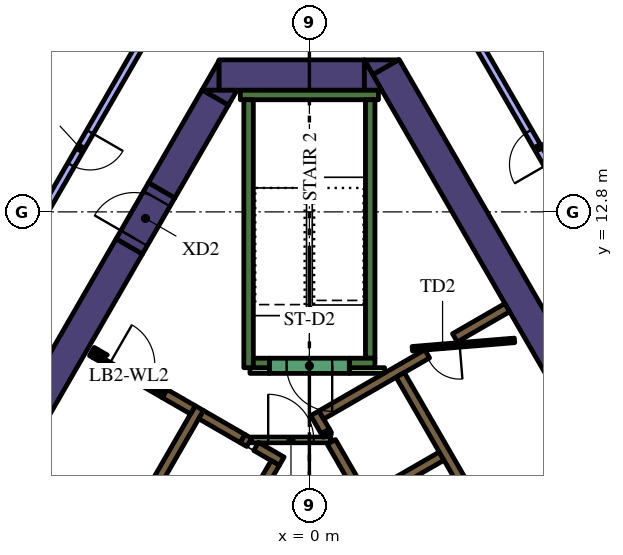
"""IFC4 building model, lengths in metres.
Left out: names, types, materials, properties, quantities, classifications, styles, units other than length and angle.
Written with IfcOpenShell. Run it as: python <this file> out.ifc"""

import sys

from ifc_helpers import new_model, si_unit, direction, frame, frame_2d, origin, place, context, subcontext, project, spatial, polyline, rectangle, outline, extrude, element, fill, save


model = new_model("IFC4")
c1 = context("Model", 3, precision=1e-05, world=origin(), true_north=direction((0.0, 1.0)))
c2 = subcontext(c1, "Body", "Model", "MODEL_VIEW")
j1 = project(units=[si_unit("LENGTHUNIT", "METRE"), si_unit("PLANEANGLEUNIT", "RADIAN")], contexts=[c1])
p1 = place(None, origin())
s1 = spatial("IfcSite", under=j1, at=p1, CompositionType="ELEMENT")
p2 = place(p1, origin())
s2 = spatial("IfcBuilding", under=s1, at=p2, CompositionType="ELEMENT")
p3 = place(p2, frame((0.0, 0.0, 154.2)))
s3 = spatial("IfcBuildingStorey", under=s2, at=p3, CompositionType="ELEMENT", Elevation=154.2)
p4 = place(p3, frame((8.279, 5.761, 0.0), z_axis=(0.0, 0.0, 1.0), x_axis=(-0.500010359015, 0.866019422922, 0.0)))
e1 = element("IfcWall", 1, at=p4, inside=s3, PredefinedType="SOLIDWALL", context=c2, shape_type="SweptSolid", body=[
    extrude(rectangle(XDim=12.528, YDim=0.8, at=frame_2d((6.264, 0.0))), origin(), (0.0, 0.0, 1.0), 4.2),
])
p5 = place(p3, origin())
e2 = element("IfcWall", 2, at=p5, inside=s3, PredefinedType="SOLIDWALL", context=c2, shape_type="SweptSolid", body=[
    extrude(outline(polyline([(1.443, 16.8), (2.339, 16.8), (1.667, 16.412), (1.443, 16.8)])), origin(), (0.0, 0.0, 1.0), 4.2),
])
p6 = place(p3, frame((-2.379, 16.4, 0.0), z_axis=(0.0, 0.0, 1.0), x_axis=(1.0, 0.0, 0.0)))
e3 = element("IfcWall", 3, at=p6, inside=s3, PredefinedType="SOLIDWALL", context=c2, shape_type="SweptSolid", body=[
    extrude(rectangle(XDim=3.824, YDim=0.8, at=frame_2d((1.912, 0.0))), origin(), (0.0, 0.0, 1.0), 4.2),
])
e4 = element("IfcWall", 4, at=p5, inside=s3, PredefinedType="SOLIDWALL", context=c2, shape_type="SweptSolid", body=[
    extrude(outline(polyline([(1.905, 16.0), (1.447, 16.0), (1.447, 16.793), (1.905, 16.0)])), origin(), (0.0, 0.0, 1.0), 4.2),
])
e5 = element("IfcWall", 5, at=p5, inside=s3, PredefinedType="SOLIDWALL", context=c2, shape_type="SweptSolid", body=[
    extrude(outline(polyline([(-2.829, 16.0), (-2.381, 16.776), (-2.381, 16.0), (-2.829, 16.0)])), origin(), (0.0, 0.0, 1.0), 4.2),
])
p7 = place(p3, frame((-2.477, 15.81, 0.0), z_axis=(0.0, 0.0, 1.0), x_axis=(-0.499969377405, -0.866043083026, 0.0)))
e6 = element("IfcWall", 6, at=p7, inside=s3, PredefinedType="SOLIDWALL", context=c2, shape_type="SweptSolid", body=[
    extrude(rectangle(XDim=2.824, YDim=0.8, at=frame_2d((1.412, 0.0))), origin(), (0.0, 0.0, 1.0), 4.2),
])
e7 = element("IfcWall", 7, at=p5, inside=s3, PredefinedType="SOLIDWALL", context=c2, shape_type="SweptSolid", body=[
    extrude(outline(polyline([(-1.905, 16.0), (-2.129, 15.612), (-2.801, 16.0), (-1.905, 16.0)])), origin(), (0.0, 0.0, 1.0), 4.2),
])
p8 = place(p3, frame((-12.668, -1.842, 0.0), z_axis=(0.0, 0.0, 1.0), x_axis=(0.500003640647, 0.866023301845, 0.0)))
e8 = element("IfcWall", 8, at=p8, inside=s3, PredefinedType="SOLIDWALL", context=c2, shape_type="SweptSolid", body=[
    extrude(rectangle(XDim=15.858, YDim=0.8, at=frame_2d((7.929, 0.0))), origin(), (0.0, 0.0, 1.0), 4.2),
])
p9 = place(p3, frame((-1.817, 15.875, 0.0), z_axis=(0.0, 0.0, 1.0), x_axis=(1.0, 0.0, 0.0)))
e9 = element("IfcWall", 9, at=p9, inside=s3, PredefinedType="SOLIDWALL", context=c2, shape_type="SweptSolid", body=[
    extrude(rectangle(XDim=3.634, YDim=0.25, at=frame_2d((1.817, 0.0))), origin(), (0.0, 0.0, 1.0), 4.2),
])
p10 = place(p3, frame((1.6, 8.95, 0.0), z_axis=(0.0, 0.0, 1.0), x_axis=(0.0, 1.0, 0.0)))
e10 = element("IfcWall", 10, at=p10, inside=s3, PredefinedType="SOLIDWALL", context=c2, shape_type="SweptSolid", body=[
    extrude(rectangle(XDim=6.8, YDim=0.25, at=frame_2d((3.4, 0.0))), origin(), (0.0, 0.0, 1.0), 4.2),
])
p11 = place(p3, frame((1.05, 8.825, 0.0), z_axis=(0.0, 0.0, 1.0), x_axis=(1.0, 0.0, 0.0)))
e11 = element("IfcWall", 11, at=p11, inside=s3, PredefinedType="SOLIDWALL", context=c2, shape_type="SweptSolid", body=[
    extrude(rectangle(XDim=0.675, YDim=0.25, at=frame_2d((0.337, 0.0))), origin(), (0.0, 0.0, 1.0), 4.2),
])
p12 = place(p3, frame((-1.6, 8.7, 0.0), z_axis=(0.0, 0.0, 1.0), x_axis=(0.0, 1.0, 0.0)))
e12 = element("IfcWall", 12, at=p12, inside=s3, PredefinedType="SOLIDWALL", context=c2, shape_type="SweptSolid", body=[
    extrude(rectangle(XDim=7.05, YDim=0.25, at=frame_2d((3.525, 0.0))), origin(), (0.0, 0.0, 1.0), 4.2),
])
p13 = place(p3, frame((-1.475, 8.825, 0.0), z_axis=(0.0, 0.0, 1.0), x_axis=(1.0, 0.0, 0.0)))
e13 = element("IfcWall", 13, at=p13, inside=s3, PredefinedType="SOLIDWALL", context=c2, shape_type="SweptSolid", body=[
    extrude(rectangle(XDim=0.425, YDim=0.25, at=frame_2d((0.212, 0.0))), origin(), (0.0, 0.0, 1.0), 4.2),
])
p14 = place(p3, frame((0.473, 6.93, 0.0), z_axis=(0.0, 0.0, 1.0), x_axis=(-0.49972245349, 0.866185586049, 0.0)))
e14 = element("IfcWall", 14, at=p14, inside=s3, PredefinedType="SOLIDWALL", context=c2, shape_type="SweptSolid", body=[
    extrude(rectangle(XDim=0.11, YDim=0.25, at=frame_2d((0.055, 0.0))), origin(), (0.0, 0.0, 1.0), 4.2),
])
p15 = place(p3, frame((6.568, -3.627, 0.0), z_axis=(0.0, 0.0, 1.0), x_axis=(-0.499999455981, 0.866025717874, 0.0)))
e15 = element("IfcWall", 15, at=p15, inside=s3, PredefinedType="SOLIDWALL", context=c2, shape_type="SweptSolid", body=[
    extrude(rectangle(XDim=11.978, YDim=0.25, at=frame_2d((5.989, 0.0))), origin(), (0.0, 0.0, 1.0), 4.2),
])
p16 = place(p3, frame((0.417, 7.027, 0.0), z_axis=(0.0, 0.0, 1.0), x_axis=(-0.500210807569, 0.865903659763, 0.0)))
e16 = element("IfcWall", 16, at=p16, inside=s3, PredefinedType="SOLIDWALL", context=c2, shape_type="SweptSolid", body=[
    extrude(rectangle(XDim=0.548, YDim=0.25, at=frame_2d((0.274, 0.0))), origin(), (0.0, 0.0, 1.0), 4.2),
])
p17 = place(p3, frame((3.1, 9.064, 0.0), z_axis=(0.0, 0.0, 1.0), x_axis=(-0.866030133475, -0.499991807846, 0.0)))
e17 = element("IfcWall", 17, at=p17, inside=s3, PredefinedType="SOLIDWALL", context=c2, shape_type="SweptSolid", body=[
    extrude(rectangle(XDim=3.217, YDim=0.25, at=frame_2d((1.608, 0.0))), origin(), (0.0, 0.0, 1.0), 4.2),
])
p18 = place(p3, frame((1.574, 5.274, 0.0), z_axis=(0.0, 0.0, 1.0), x_axis=(0.866028486751, 0.499994660107, 0.0)))
e18 = element("IfcWall", 18, at=p18, inside=s3, PredefinedType="SOLIDWALL", context=c2, shape_type="SweptSolid", body=[
    extrude(rectangle(XDim=2.2, YDim=0.25, at=frame_2d((1.1, 0.0))), origin(), (0.0, 0.0, 1.0), 4.2),
])
p19 = place(p3, frame((3.83, 9.486, 0.0), z_axis=(0.0, 0.0, 1.0), x_axis=(0.865986202621, 0.500067892261, 0.0)))
e19 = element("IfcWall", 19, at=p19, inside=s3, PredefinedType="SOLIDWALL", context=c2, shape_type="SweptSolid", body=[
    extrude(rectangle(XDim=1.591, YDim=0.25, at=frame_2d((0.795, 0.0))), origin(), (0.0, 0.0, 1.0), 4.2),
])
p20 = place(p3, frame((-8.06, -1.311, 0.0), z_axis=(0.0, 0.0, 1.0), x_axis=(0.50000273126, 0.866023826885, 0.0)))
e20 = element("IfcWall", 20, at=p20, inside=s3, PredefinedType="SOLIDWALL", context=c2, shape_type="SweptSolid", body=[
    extrude(rectangle(XDim=10.33, YDim=0.25, at=frame_2d((5.165, 0.0))), origin(), (0.0, 0.0, 1.0), 4.2),
])
p21 = place(p3, frame((-1.758, 6.835, 0.0), z_axis=(0.0, 0.0, 1.0), x_axis=(0.865982457891, -0.500074377092, 0.0)))
e21 = element("IfcWall", 21, at=p21, inside=s3, PredefinedType="SOLIDWALL", context=c2, shape_type="SweptSolid", body=[
    extrude(rectangle(XDim=0.2, YDim=0.25, at=frame_2d((0.1, 0.0))), origin(), (0.0, 0.0, 1.0), 4.2),
])
p22 = place(p3, frame((-1.76, 6.836, 0.0), z_axis=(0.0, 0.0, 1.0), x_axis=(-0.865952863304, 0.500125622755, 0.0)))
e22 = element("IfcWall", 22, at=p22, inside=s3, PredefinedType="SOLIDWALL", context=c2, shape_type="SweptSolid", body=[
    extrude(rectangle(XDim=1.258, YDim=0.25, at=frame_2d((0.629, 0.0))), origin(), (0.0, 0.0, 1.0), 4.2),
])
p23 = place(p3, frame((-0.728, 6.24, 0.0), z_axis=(0.0, 0.0, 1.0), x_axis=(-0.865955664968, 0.500120771724, 0.0)))
e23 = element("IfcWall", 23, at=p23, inside=s3, PredefinedType="SOLIDWALL", context=c2, shape_type="SweptSolid", body=[
    extrude(rectangle(XDim=0.778, YDim=0.25, at=frame_2d((0.389, 0.0))), origin(), (0.0, 0.0, 1.0), 4.2),
])
p24 = place(p3, frame((-5.725, 9.125, 0.0), z_axis=(0.0, 0.0, 1.0), x_axis=(0.866185586049, -0.49972245349, 0.0)))
e24 = element("IfcWall", 24, at=p24, inside=s3, PredefinedType="SOLIDWALL", context=c2, shape_type="SweptSolid", body=[
    extrude(rectangle(XDim=0.11, YDim=0.25, at=frame_2d((0.055, 0.0))), origin(), (0.0, 0.0, 1.0), 4.2),
])
p25 = place(p3, frame((-3.066, 7.59, 0.0), z_axis=(0.0, 0.0, 1.0), x_axis=(-0.866081358704, 0.49990307071, 0.0)))
e25 = element("IfcWall", 25, at=p25, inside=s3, PredefinedType="SOLIDWALL", context=c2, shape_type="SweptSolid", body=[
    extrude(rectangle(XDim=0.858, YDim=0.25, at=frame_2d((0.429, 0.0))), origin(), (0.0, 0.0, 1.0), 4.2),
])
e26 = element("IfcWall", 26, at=p5, inside=s3, PredefinedType="SOLIDWALL", context=c2, shape_type="SweptSolid", body=[
    extrude(outline(polyline([(-3.748, 8.128), (-3.813, 8.015), (-4.027, 8.139), (-4.017, 8.156), (-4.008, 8.173), (-4.0, 8.192), (-3.995, 8.21), (-3.991, 8.23), (-3.99, 8.25), (-3.99, 8.268), (-3.748, 8.128)])), origin(), (0.0, 0.0, 1.0), 4.2),
])
e27 = element("IfcWall", 27, at=p5, inside=s3, PredefinedType="SOLIDWALL", context=c2, shape_type="SweptSolid", body=[
    extrude(outline(polyline([(-5.689, 8.96), (-5.69, 8.961), (-5.565, 9.177), (-5.319, 9.035), (-5.335, 9.026), (-5.351, 9.015), (-5.366, 9.002), (-5.379, 8.988), (-5.392, 8.972), (-5.402, 8.956), (-5.412, 8.939), (-5.629, 9.064), (-5.629, 9.064), (-5.689, 8.96)])), origin(), (0.0, 0.0, 1.0), 4.2),
])
p26 = place(p3, frame((1.05, 8.625, 0.0), z_axis=(0.0, 0.0, 1.0), x_axis=(1.0, 0.0, 0.0)))
e28 = element("IfcWall", 28, at=p26, inside=s3, PredefinedType="PARTITIONING", context=c2, shape_type="SweptSolid", body=[
    extrude(rectangle(XDim=0.929, YDim=0.15, at=frame_2d((0.464, 0.0))), origin(), (0.0, 0.0, 1.0), 3.15),
])
p27 = place(p3, frame((-1.564, 8.625, 0.0), z_axis=(0.0, 0.0, 1.0), x_axis=(1.0, 0.0, 0.0)))
e29 = element("IfcWall", 29, at=p27, inside=s3, PredefinedType="PARTITIONING", context=c2, shape_type="SweptSolid", body=[
    extrude(rectangle(XDim=0.514, YDim=0.15, at=frame_2d((0.257, 0.0))), origin(), (0.0, 0.0, 1.0), 3.15),
])
p28 = place(p3, frame((8.565, -2.185, 0.0), z_axis=(0.0, 0.0, 1.0), x_axis=(-0.499997954832, 0.866026584559, 0.0)))
e30 = element("IfcWall", 30, at=p28, inside=s3, PredefinedType="SOLIDWALL", context=c2, shape_type="SweptSolid", body=[
    extrude(rectangle(XDim=12.35, YDim=0.25, at=frame_2d((6.175, 0.0))), origin(), (0.0, 0.0, 1.0), 4.2),
])
p29 = place(p28, frame((0.585, 0.0, 0.0)))
e31 = element("IfcOpeningElement", 31, at=p29, cuts=e30, PredefinedType="OPENING", context=c2, shape_type="SweptSolid", body=[
    extrude(rectangle(XDim=1.1, YDim=2.1, at=frame_2d((0.55, 1.05))), frame((0.0, 0.135, 0.0), z_axis=(0.0, -1.0, 0.0), x_axis=(1.0, 0.0, 0.0)), (0.0, 0.0, 1.0), 0.27),
])
p30 = place(p3, frame((-0.898, 6.194, 0.0), z_axis=(0.0, 0.0, 1.0), x_axis=(-0.499996202215, -0.866027596426, 0.0)))
e32 = element("IfcWall", 32, at=p30, inside=s3, PredefinedType="SOLIDWALL", context=c2, shape_type="SweptSolid", body=[
    extrude(rectangle(XDim=9.83, YDim=0.25, at=frame_2d((4.915, 0.0))), origin(), (0.0, 0.0, 1.0), 4.2),
])
p31 = place(p30, frame((0.585, 0.0, 0.0)))
e33 = element("IfcOpeningElement", 33, at=p31, cuts=e32, PredefinedType="OPENING", context=c2, shape_type="SweptSolid", body=[
    extrude(rectangle(XDim=1.1, YDim=2.1, at=frame_2d((0.55, 1.05))), frame((0.0, 0.135, 0.0), z_axis=(0.0, -1.0, 0.0), x_axis=(1.0, 0.0, 0.0)), (0.0, 0.0, 1.0), 0.27),
])
p32 = place(p30, frame((3.105, 0.0, 0.0)))
e34 = element("IfcOpeningElement", 34, at=p32, cuts=e32, PredefinedType="OPENING", context=c2, shape_type="SweptSolid", body=[
    extrude(rectangle(XDim=1.1, YDim=2.1, at=frame_2d((0.55, 1.05))), frame((0.0, 0.135, 0.0), z_axis=(0.0, -1.0, 0.0), x_axis=(1.0, 0.0, 0.0)), (0.0, 0.0, 1.0), 0.27),
])
p33 = place(p30, frame((5.625, 0.0, 0.0)))
e35 = element("IfcOpeningElement", 35, at=p33, cuts=e32, PredefinedType="OPENING", context=c2, shape_type="SweptSolid", body=[
    extrude(rectangle(XDim=1.1, YDim=2.1, at=frame_2d((0.55, 1.05))), frame((0.0, 0.135, 0.0), z_axis=(0.0, -1.0, 0.0), x_axis=(1.0, 0.0, 0.0)), (0.0, 0.0, 1.0), 0.27),
])
p34 = place(p30, frame((8.145, 0.0, 0.0)))
e36 = element("IfcOpeningElement", 36, at=p34, cuts=e32, PredefinedType="OPENING", context=c2, shape_type="SweptSolid", body=[
    extrude(rectangle(XDim=1.1, YDim=2.1, at=frame_2d((0.55, 1.05))), frame((0.0, 0.135, 0.0), z_axis=(0.0, -1.0, 0.0), x_axis=(1.0, 0.0, 0.0)), (0.0, 0.0, 1.0), 0.27),
])
p35 = place(p3, frame((1.05, 8.75, 0.0), z_axis=(0.0, 0.0, 1.0), x_axis=(-1.0, 0.0, 0.0)))
e37 = element("IfcWall", 37, at=p35, inside=s3, PredefinedType="SOLIDWALL", context=c2, shape_type="SweptSolid", body=[
    extrude(rectangle(XDim=2.1, YDim=0.4, at=frame_2d((1.05, 0.0))), origin(), (0.0, 0.0, 1.0), 4.2),
])
p36 = place(p35, frame((0.45, 0.0, 0.0)))
e38 = element("IfcOpeningElement", 38, at=p36, cuts=e37, PredefinedType="OPENING", context=c2, shape_type="SweptSolid", body=[
    extrude(rectangle(XDim=1.2, YDim=2.1, at=frame_2d((0.6, 1.05))), frame((0.0, 0.21, 0.0), z_axis=(0.0, -1.0, 0.0), x_axis=(1.0, 0.0, 0.0)), (0.0, 0.0, 1.0), 0.42),
])
p37 = place(p3, frame((5.398, 9.419, 0.0), z_axis=(0.0, 0.0, 1.0), x_axis=(-0.996653416376, -0.081743303248, 0.0)))
e39 = element("IfcWall", 39, at=p37, inside=s3, PredefinedType="PARTITIONING", context=c2, shape_type="SweptSolid", body=[
    extrude(rectangle(XDim=2.7, YDim=0.12, at=frame_2d((1.35, 0.0))), origin(), (0.0, 0.0, 1.0), 3.15),
])
p38 = place(p37, frame((1.45, 0.0, 0.0)))
e40 = element("IfcOpeningElement", 40, at=p38, cuts=e39, PredefinedType="OPENING", context=c2, shape_type="SweptSolid", body=[
    extrude(rectangle(XDim=0.9, YDim=2.1, at=frame_2d((0.45, 1.05))), frame((0.0, 0.07, 0.0), z_axis=(0.0, -1.0, 0.0), x_axis=(1.0, 0.0, 0.0)), (0.0, 0.0, 1.0), 0.14),
])
p39 = place(p3, frame((-1.534, 6.8, 0.0), z_axis=(0.0, 0.0, 1.0), x_axis=(1.0, 0.0, 0.0)))
e41 = element("IfcWall", 41, at=p39, inside=s3, PredefinedType="PARTITIONING", context=c2, shape_type="SweptSolid", body=[
    extrude(rectangle(XDim=2.1, YDim=0.15, at=frame_2d((1.05, 0.0))), origin(), (0.0, 0.0, 1.0), 3.15),
])
p40 = place(p39, frame((0.45, 0.0, 0.0)))
e42 = element("IfcOpeningElement", 42, at=p40, cuts=e41, PredefinedType="OPENING", context=c2, shape_type="SweptSolid", body=[
    extrude(rectangle(XDim=1.2, YDim=2.1, at=frame_2d((0.6, 1.05))), frame((0.0, 0.085, 0.0), z_axis=(0.0, -1.0, 0.0), x_axis=(1.0, 0.0, 0.0)), (0.0, 0.0, 1.0), 0.17),
])
p41 = place(p3, frame((-5.659, 9.012, 0.0), z_axis=(0.0, 0.0, 1.0), x_axis=(0.866009402589, -0.500027713859, 0.0)))
e43 = element("IfcWall", 43, at=p41, inside=s3, PredefinedType="PARTITIONING", context=c2, shape_type="SweptSolid", body=[
    extrude(rectangle(XDim=2.1, YDim=0.12, at=frame_2d((1.05, 0.0))), origin(), (0.0, 0.0, 1.0), 3.15),
])
p42 = place(p41, frame((0.45, 0.0, 0.0)))
e44 = element("IfcOpeningElement", 44, at=p42, cuts=e43, PredefinedType="OPENING", context=c2, shape_type="SweptSolid", body=[
    extrude(rectangle(XDim=1.2, YDim=2.1, at=frame_2d((0.6, 1.05))), frame((0.0, 0.07, 0.0), z_axis=(0.0, -1.0, 0.0), x_axis=(1.0, 0.0, 0.0)), (0.0, 0.0, 1.0), 0.14),
])
p43 = place(p3, frame((-4.739, 11.892, 0.0), z_axis=(0.0, 0.0, 1.0), x_axis=(0.500062241894, 0.865989465428, 0.0)))
e45 = element("IfcWall", 45, at=p43, inside=s3, PredefinedType="SOLIDWALL", context=c2, shape_type="SweptSolid", body=[
    extrude(rectangle(XDim=1.7, YDim=0.8, at=frame_2d((0.85, 0.0))), origin(), (0.0, 0.0, 1.0), 4.2),
])
p44 = place(p43, frame((0.25, 0.0, 0.0)))
e46 = element("IfcOpeningElement", 46, at=p44, cuts=e45, PredefinedType="OPENING", context=c2, shape_type="SweptSolid", body=[
    extrude(rectangle(XDim=1.2, YDim=2.1, at=frame_2d((0.6, 1.05))), frame((0.0, 0.41, 0.0), z_axis=(0.0, -1.0, 0.0), x_axis=(1.0, 0.0, 0.0)), (0.0, 0.0, 1.0), 0.82),
])
p45 = place(p3, frame((6.013, 21.573, 0.0), z_axis=(0.0, 0.0, 1.0), x_axis=(0.551906048292, -0.833906298009, 0.0)))
e47 = element("IfcWall", 47, at=p45, inside=s3, PredefinedType="PARTITIONING", context=c2, shape_type="SweptSolid", body=[
    extrude(rectangle(XDim=5.995, YDim=0.15, at=frame_2d((2.998, 0.0))), origin(), (0.0, 0.0, 1.0), 3.15),
])
p46 = place(p45, frame((2.595, 0.0, 0.0)))
e48 = element("IfcOpeningElement", 48, at=p46, cuts=e47, PredefinedType="OPENING", context=c2, shape_type="SweptSolid", body=[
    extrude(rectangle(XDim=0.9, YDim=2.1, at=frame_2d((0.45, 1.05))), frame((0.0, 0.085, 0.0), z_axis=(0.0, -1.0, 0.0), x_axis=(1.0, 0.0, 0.0)), (0.0, 0.0, 1.0), 0.17),
])
p47 = place(p3, frame((8.515, 10.152, 0.0), z_axis=(0.0, 0.0, 1.0), x_axis=(-0.499998974385, 0.866025995923, 0.0)))
e49 = element("IfcWall", 49, at=p47, inside=s3, PredefinedType="PARTITIONING", context=c2, shape_type="SweptSolid", body=[
    extrude(rectangle(XDim=9.986, YDim=0.2, at=frame_2d((4.993, 0.0))), origin(), (0.0, 0.0, 1.0), 3.15),
])
p48 = place(p47, frame((4.5, 0.0, 0.0)))
e50 = element("IfcOpeningElement", 50, at=p48, cuts=e49, PredefinedType="OPENING", context=c2, shape_type="SweptSolid", body=[
    extrude(rectangle(XDim=1.0, YDim=2.1, at=frame_2d((0.5, 1.05))), frame((0.0, 0.11, 0.0), z_axis=(0.0, -1.0, 0.0), x_axis=(1.0, 0.0, 0.0)), (0.0, 0.0, 1.0), 0.22),
])
p49 = place(p3, frame((-9.322, 16.573, 0.0), z_axis=(0.0, 0.0, 1.0), x_axis=(0.551906048292, 0.833906298009, 0.0)))
e51 = element("IfcWall", 51, at=p49, inside=s3, PredefinedType="PARTITIONING", context=c2, shape_type="SweptSolid", body=[
    extrude(rectangle(XDim=5.995, YDim=0.15, at=frame_2d((2.998, 0.0))), origin(), (0.0, 0.0, 1.0), 3.15),
])
p50 = place(p49, frame((2.595, 0.0, 0.0)))
e52 = element("IfcOpeningElement", 52, at=p50, cuts=e51, PredefinedType="OPENING", context=c2, shape_type="SweptSolid", body=[
    extrude(rectangle(XDim=0.9, YDim=2.1, at=frame_2d((0.45, 1.05))), frame((0.0, 0.085, 0.0), z_axis=(0.0, -1.0, 0.0), x_axis=(1.0, 0.0, 0.0)), (0.0, 0.0, 1.0), 0.17),
])
p51 = place(p3, frame((-3.522, 18.8, 0.0), z_axis=(0.0, 0.0, 1.0), x_axis=(-0.500015783377, -0.866016291056, 0.0)))
e53 = element("IfcWall", 53, at=p51, inside=s3, PredefinedType="PARTITIONING", context=c2, shape_type="SweptSolid", body=[
    extrude(rectangle(XDim=9.99, YDim=0.2, at=frame_2d((4.995, 0.0))), origin(), (0.0, 0.0, 1.0), 3.15),
])
p52 = place(p51, frame((4.5, 0.0, 0.0)))
e54 = element("IfcOpeningElement", 54, at=p52, cuts=e53, PredefinedType="OPENING", context=c2, shape_type="SweptSolid", body=[
    extrude(rectangle(XDim=1.0, YDim=2.1, at=frame_2d((0.5, 1.05))), frame((0.0, 0.11, 0.0), z_axis=(0.0, -1.0, 0.0), x_axis=(1.0, 0.0, 0.0)), (0.0, 0.0, 1.0), 0.22),
])
p53 = place(p36, origin())
e55 = element("IfcDoor", 55, at=p53, inside=s3, OperationType="SINGLE_SWING_LEFT", PredefinedType="DOOR", context=c2, shape_type="SweptSolid", body=[
    extrude(rectangle(XDim=1.2, YDim=2.1, at=frame_2d((0.6, 1.05))), frame((0.0, 0.025, 0.0), z_axis=(0.0, -1.0, 0.0), x_axis=(1.0, 0.0, 0.0)), (0.0, 0.0, 1.0), 0.05),
])
fill(e38, e55)
p54 = place(p38, origin())
e56 = element("IfcDoor", 56, at=p54, inside=s3, OperationType="SINGLE_SWING_LEFT", PredefinedType="DOOR", context=c2, shape_type="SweptSolid", body=[
    extrude(rectangle(XDim=0.9, YDim=2.1, at=frame_2d((0.45, 1.05))), frame((0.0, 0.025, 0.0), z_axis=(0.0, -1.0, 0.0), x_axis=(1.0, 0.0, 0.0)), (0.0, 0.0, 1.0), 0.05),
])
fill(e40, e56)
p55 = place(p40, origin())
e57 = element("IfcDoor", 57, at=p55, inside=s3, OperationType="SINGLE_SWING_LEFT", PredefinedType="DOOR", context=c2, shape_type="SweptSolid", body=[
    extrude(rectangle(XDim=1.2, YDim=2.1, at=frame_2d((0.6, 1.05))), frame((0.0, 0.025, 0.0), z_axis=(0.0, -1.0, 0.0), x_axis=(1.0, 0.0, 0.0)), (0.0, 0.0, 1.0), 0.05),
])
fill(e42, e57)
p56 = place(p42, origin())
e58 = element("IfcDoor", 58, at=p56, inside=s3, OperationType="SINGLE_SWING_LEFT", PredefinedType="DOOR", context=c2, shape_type="SweptSolid", body=[
    extrude(rectangle(XDim=1.2, YDim=2.1, at=frame_2d((0.6, 1.05))), frame((0.0, 0.025, 0.0), z_axis=(0.0, -1.0, 0.0), x_axis=(1.0, 0.0, 0.0)), (0.0, 0.0, 1.0), 0.05),
])
fill(e44, e58)
p57 = place(p44, origin())
e59 = element("IfcDoor", 59, at=p57, inside=s3, OperationType="SINGLE_SWING_LEFT", PredefinedType="DOOR", context=c2, shape_type="SweptSolid", body=[
    extrude(rectangle(XDim=1.2, YDim=2.1, at=frame_2d((0.6, 1.05))), frame((0.0, 0.025, 0.0), z_axis=(0.0, -1.0, 0.0), x_axis=(1.0, 0.0, 0.0)), (0.0, 0.0, 1.0), 0.05),
])
fill(e46, e59)
p58 = place(p48, origin())
e60 = element("IfcDoor", 60, at=p58, inside=s3, OperationType="SINGLE_SWING_RIGHT", PredefinedType="DOOR", context=c2, shape_type="SweptSolid", body=[
    extrude(rectangle(XDim=1.0, YDim=2.1, at=frame_2d((0.5, 1.05))), frame((0.0, 0.025, 0.0), z_axis=(0.0, -1.0, 0.0), x_axis=(1.0, 0.0, 0.0)), (0.0, 0.0, 1.0), 0.05),
])
fill(e50, e60)
p59 = place(p52, origin())
e61 = element("IfcDoor", 61, at=p59, inside=s3, OperationType="SINGLE_SWING_RIGHT", PredefinedType="DOOR", context=c2, shape_type="SweptSolid", body=[
    extrude(rectangle(XDim=1.0, YDim=2.1, at=frame_2d((0.5, 1.05))), frame((0.0, 0.025, 0.0), z_axis=(0.0, -1.0, 0.0), x_axis=(1.0, 0.0, 0.0)), (0.0, 0.0, 1.0), 0.05),
])
fill(e54, e61)
save(model, sys.argv[1])
